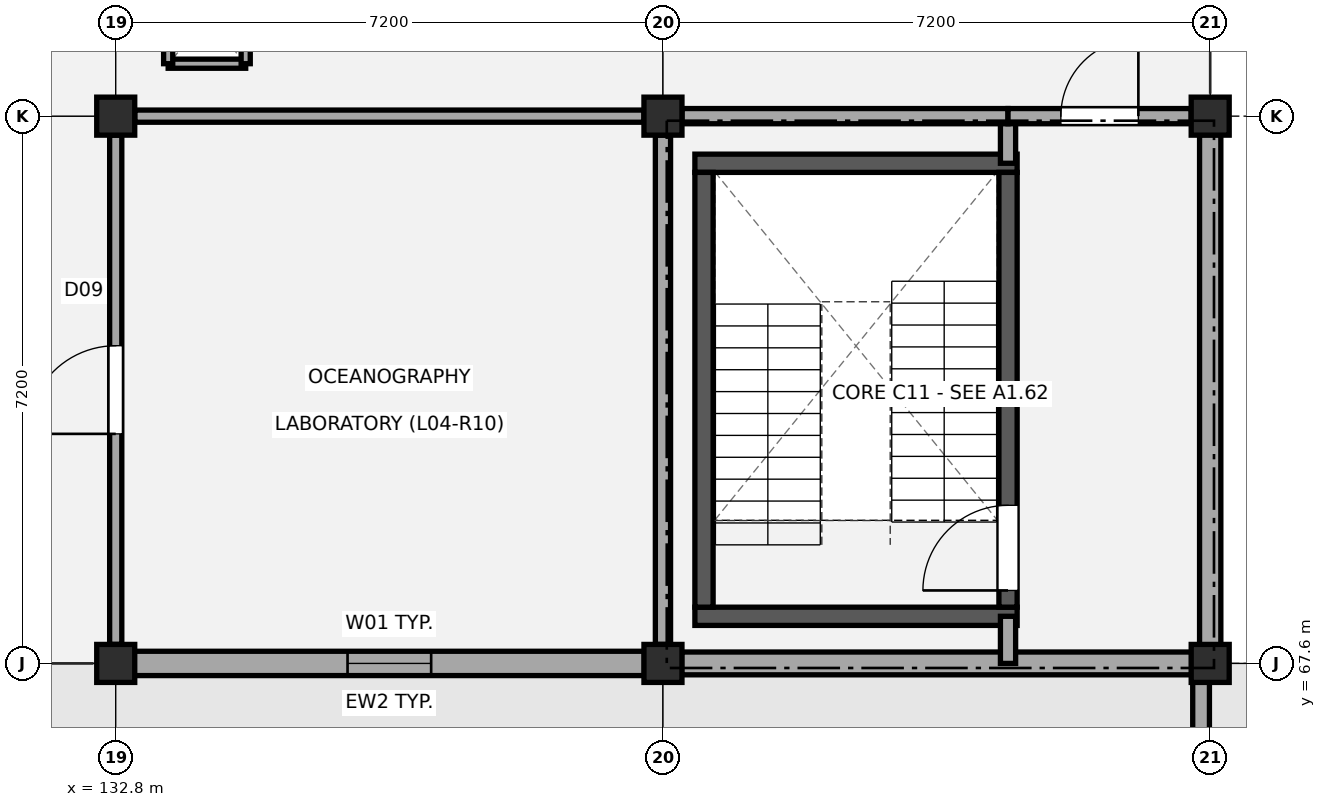
"""IFC4 building model, lengths in metres.
Left out: names, types, materials, properties, quantities, classifications, styles, units other than length and angle.
Written with IfcOpenShell. Run it as: python <this file> out.ifc"""

import sys

from ifc_helpers import new_model, si_unit, direction, frame, frame_2d, origin, origin_2d, place, context, subcontext, project, spatial, rectangle, extrude, element, fill, save


model = new_model("IFC4")
c1 = context("Model", 3, precision=1e-05, world=origin(), true_north=direction((0.0, 1.0)))
c2 = subcontext(c1, "Body", "Model", "MODEL_VIEW")
j1 = project(units=[si_unit("LENGTHUNIT", "METRE"), si_unit("PLANEANGLEUNIT", "RADIAN")], contexts=[c1])
p1 = place(None, origin())
s1 = spatial("IfcSite", under=j1, at=p1, CompositionType="ELEMENT")
p2 = place(p1, origin())
s2 = spatial("IfcBuilding", under=s1, at=p2, CompositionType="ELEMENT")
p3 = place(p2, frame((0.0, 0.0, 17.64)))
s3 = spatial("IfcBuildingStorey", under=s2, at=p3, CompositionType="ELEMENT", Elevation=17.64)
for number, where, z_axis, x_axis in (
    (1, (132.8, 67.6, 0.0), (0.0, 0.0, 1.0), (1.0, 0.0, 0.0)),
    (2, (132.8, 74.8, 0.0), (0.0, 0.0, 1.0), (1.0, 0.0, 0.0)),
    (3, (140.0, 67.6, 0.0), (0.0, 0.0, 1.0), (1.0, 0.0, 0.0)),
    (4, (140.0, 74.8, 0.0), (0.0, 0.0, 1.0), (1.0, 0.0, 0.0)),
    (5, (147.2, 67.6, 0.0), (0.0, 0.0, 1.0), (1.0, 0.0, 0.0)),
    (6, (147.2, 74.8, 0.0), (0.0, 0.0, 1.0), (1.0, 0.0, 0.0)),
):
    element("IfcColumn", number, at=place(p3, frame(where, z_axis=z_axis, x_axis=x_axis)), inside=s3, PredefinedType="COLUMN", context=c2, shape_type="SweptSolid", body=[
        extrude(rectangle(XDim=0.5, YDim=0.5, at=origin_2d()), origin(), (0.0, 0.0, 1.0), 3.96),
    ])
p4 = place(p3, frame((139.755, 67.6, 0.0), z_axis=(0.0, 0.0, 1.0), x_axis=(-1.0, 0.0, 0.0)))
e7 = element("IfcWall", 7, at=p4, inside=s3, PredefinedType="STANDARD", context=c2, shape_type="SweptSolid", body=[
    extrude(rectangle(XDim=6.71, YDim=0.32, at=frame_2d((3.355, 0.0))), origin(), (0.0, 0.0, 1.0), 3.12),
])
p5 = place(p4, frame((2.805, 0.0, 0.95)))
e8 = element("IfcOpeningElement", 8, at=p5, cuts=e7, PredefinedType="OPENING", context=c2, shape_type="SweptSolid", body=[
    extrude(rectangle(XDim=1.1, YDim=1.4, at=frame_2d((0.55, 0.7))), frame((0.0, 0.17, 0.0), z_axis=(0.0, -1.0, 0.0), x_axis=(1.0, 0.0, 0.0)), (0.0, 0.0, 1.0), 0.34),
])
p6 = place(p3, frame((146.955, 67.6, 0.0), z_axis=(0.0, 0.0, 1.0), x_axis=(-1.0, 0.0, 0.0)))
e9 = element("IfcWall", 9, at=p6, inside=s3, PredefinedType="STANDARD", context=c2, shape_type="SweptSolid", body=[
    extrude(rectangle(XDim=6.71, YDim=0.3, at=frame_2d((3.355, 0.0))), origin(), (0.0, 0.0, 1.0), 3.14),
])
p7 = place(p3, frame((147.2, 74.555, 0.0), z_axis=(0.0, 0.0, 1.0), x_axis=(0.0, -1.0, 0.0)))
e10 = element("IfcWall", 10, at=p7, inside=s3, PredefinedType="STANDARD", context=c2, shape_type="SweptSolid", body=[
    extrude(rectangle(XDim=6.71, YDim=0.28, at=frame_2d((3.355, 0.0))), origin(), (0.0, 0.0, 1.0), 3.14),
])
p8 = place(p3, frame((147.08, 60.4, 0.0), z_axis=(0.0, 0.0, 1.0), x_axis=(0.0, 1.0, 0.0)))
e11 = element("IfcWall", 11, at=p8, inside=s3, PredefinedType="PARAPET", context=c2, shape_type="SweptSolid", body=[
    extrude(rectangle(XDim=7.2, YDim=0.22, at=frame_2d((3.6, 0.0))), origin(), (0.0, 0.0, 1.0), 0.72),
])
for number, where, z_axis, x_axis in (
    (12, (140.42, 68.22, 0.0), (0.0, 0.0, 1.0), (1.0, 0.0, 0.0)),
    (13, (140.42, 74.18, 0.0), (0.0, 0.0, 1.0), (1.0, 0.0, 0.0)),
):
    element("IfcWall", number, at=place(p3, frame(where, z_axis=z_axis, x_axis=x_axis)), inside=s3, PredefinedType="SHEAR", context=c2, shape_type="SweptSolid", body=[
        extrude(rectangle(XDim=4.24, YDim=0.24, at=frame_2d((2.12, 0.0))), origin(), (0.0, 0.0, 1.0), 3.7),
    ])
p9 = place(p3, frame((140.54, 68.34, 0.0), z_axis=(0.0, 0.0, 1.0), x_axis=(0.0, 1.0, 0.0)))
e14 = element("IfcWall", 14, at=p9, inside=s3, PredefinedType="SHEAR", context=c2, shape_type="SweptSolid", body=[
    extrude(rectangle(XDim=5.72, YDim=0.24, at=frame_2d((2.86, 0.0))), origin(), (0.0, 0.0, 1.0), 3.7),
])
p10 = place(p3, frame((144.54, 68.34, 0.0), z_axis=(0.0, 0.0, 1.0), x_axis=(0.0, 1.0, 0.0)))
e15 = element("IfcWall", 15, at=p10, inside=s3, PredefinedType="SHEAR", context=c2, shape_type="SweptSolid", body=[
    extrude(rectangle(XDim=5.72, YDim=0.24, at=frame_2d((2.86, 0.0))), origin(), (0.0, 0.0, 1.0), 3.7),
])
p11 = place(p10, frame((0.22, 0.0, 0.0)))
e16 = element("IfcOpeningElement", 16, at=p11, cuts=e15, PredefinedType="OPENING", context=c2, shape_type="SweptSolid", body=[
    extrude(rectangle(XDim=1.12, YDim=2.15, at=frame_2d((0.56, 1.075))), frame((0.0, 0.13, 0.0), z_axis=(0.0, -1.0, 0.0), x_axis=(1.0, 0.0, 0.0)), (0.0, 0.0, 1.0), 0.26),
])
p12 = place(p3, frame((144.54, 67.6, 0.0), z_axis=(0.0, 0.0, 1.0), x_axis=(0.0, 1.0, 0.0)))
e17 = element("IfcWall", 17, at=p12, inside=s3, PredefinedType="PARTITIONING", context=c2, shape_type="SweptSolid", body=[
    extrude(rectangle(XDim=0.62, YDim=0.2, at=frame_2d((0.31, 0.0))), origin(), (0.0, 0.0, 1.0), 3.14),
])
p13 = place(p3, frame((144.54, 74.18, 0.0), z_axis=(0.0, 0.0, 1.0), x_axis=(0.0, 1.0, 0.0)))
e18 = element("IfcWall", 18, at=p13, inside=s3, PredefinedType="PARTITIONING", context=c2, shape_type="SweptSolid", body=[
    extrude(rectangle(XDim=0.62, YDim=0.2, at=frame_2d((0.31, 0.0))), origin(), (0.0, 0.0, 1.0), 3.09),
])
p14 = place(p3, frame((140.0, 67.85, 0.0), z_axis=(0.0, 0.0, 1.0), x_axis=(0.0, 1.0, 0.0)))
e19 = element("IfcWall", 19, at=p14, inside=s3, PredefinedType="PARTITIONING", context=c2, shape_type="SweptSolid", body=[
    extrude(rectangle(XDim=6.7, YDim=0.2, at=frame_2d((3.35, 0.0))), origin(), (0.0, 0.0, 1.0), 3.07),
])
p15 = place(p3, frame((140.25, 74.8, 0.0), z_axis=(0.0, 0.0, 1.0), x_axis=(1.0, 0.0, 0.0)))
e20 = element("IfcWall", 20, at=p15, inside=s3, PredefinedType="PARTITIONING", context=c2, shape_type="SweptSolid", body=[
    extrude(rectangle(XDim=4.29, YDim=0.2, at=frame_2d((2.145, 0.0))), origin(), (0.0, 0.0, 1.0), 3.09),
])
p16 = place(p3, frame((144.54, 74.8, 0.0), z_axis=(0.0, 0.0, 1.0), x_axis=(1.0, 0.0, 0.0)))
e21 = element("IfcWall", 21, at=p16, inside=s3, PredefinedType="PARTITIONING", context=c2, shape_type="SweptSolid", body=[
    extrude(rectangle(XDim=2.41, YDim=0.2, at=frame_2d((1.205, 0.0))), origin(), (0.0, 0.0, 1.0), 3.09),
])
p17 = place(p16, frame((0.695, 0.0, 0.0)))
e22 = element("IfcOpeningElement", 22, at=p17, cuts=e21, PredefinedType="OPENING", context=c2, shape_type="SweptSolid", body=[
    extrude(rectangle(XDim=1.02, YDim=2.15, at=frame_2d((0.51, 1.075))), frame((0.0, 0.11, 0.0), z_axis=(0.0, -1.0, 0.0), x_axis=(1.0, 0.0, 0.0)), (0.0, 0.0, 1.0), 0.22),
])
p18 = place(p3, frame((133.49, 75.49, 0.0), z_axis=(0.0, 0.0, 1.0), x_axis=(1.0, 0.0, 0.0)))
e23 = element("IfcWall", 23, at=p18, inside=s3, PredefinedType="PARTITIONING", context=c2, shape_type="SweptSolid", body=[
    extrude(rectangle(XDim=1.02, YDim=0.12, at=frame_2d((0.51, 0.0))), origin(), (0.0, 0.0, 1.0), 3.66),
])
for number, where, z_axis, x_axis in (
    (24, (133.49, 75.49, 0.0), (0.0, 0.0, 1.0), (0.0, 1.0, 0.0)),
    (25, (134.51, 75.49, 0.0), (0.0, 0.0, 1.0), (0.0, 1.0, 0.0)),
):
    element("IfcWall", number, at=place(p3, frame(where, z_axis=z_axis, x_axis=x_axis)), inside=s3, PredefinedType="PARTITIONING", context=c2, shape_type="SweptSolid", body=[
        extrude(rectangle(XDim=1.32, YDim=0.12, at=frame_2d((0.66, 0.0))), origin(), (0.0, 0.0, 1.0), 3.66),
    ])
p19 = place(p3, frame((132.8, 67.85, 0.0), z_axis=(0.0, 0.0, 1.0), x_axis=(0.0, 1.0, 0.0)))
e26 = element("IfcWall", 26, at=p19, inside=s3, PredefinedType="PARTITIONING", context=c2, shape_type="SweptSolid", body=[
    extrude(rectangle(XDim=6.7, YDim=0.16, at=frame_2d((3.35, 0.0))), origin(), (0.0, 0.0, 1.0), 3.07),
])
p20 = place(p19, frame((2.77, 0.0, 0.0)))
e27 = element("IfcOpeningElement", 27, at=p20, cuts=e26, PredefinedType="OPENING", context=c2, shape_type="SweptSolid", body=[
    extrude(rectangle(XDim=1.16, YDim=2.18, at=frame_2d((0.58, 1.09))), frame((0.0, 0.09, 0.0), z_axis=(0.0, -1.0, 0.0), x_axis=(1.0, 0.0, 0.0)), (0.0, 0.0, 1.0), 0.18),
])
p21 = place(p3, frame((133.05, 74.8, 0.0), z_axis=(0.0, 0.0, 1.0), x_axis=(1.0, 0.0, 0.0)))
e28 = element("IfcWall", 28, at=p21, inside=s3, PredefinedType="PARTITIONING", context=c2, shape_type="SweptSolid", body=[
    extrude(rectangle(XDim=6.7, YDim=0.16, at=frame_2d((3.35, 0.0))), origin(), (0.0, 0.0, 1.0), 3.02),
])
p22 = place(p5, origin())
e29 = element("IfcWindow", 29, at=p22, inside=s3, PartitioningType="SINGLE_PANEL", PredefinedType="WINDOW", context=c2, shape_type="SweptSolid", body=[
    extrude(rectangle(XDim=1.1, YDim=1.4, at=frame_2d((0.55, 0.7))), frame((0.0, 0.03, 0.0), z_axis=(0.0, -1.0, 0.0), x_axis=(1.0, 0.0, 0.0)), (0.0, 0.0, 1.0), 0.06),
])
fill(e8, e29)
p23 = place(p11, origin())
e30 = element("IfcDoor", 30, at=p23, inside=s3, OperationType="SINGLE_SWING_LEFT", PredefinedType="DOOR", context=c2, shape_type="SweptSolid", body=[
    extrude(rectangle(XDim=1.12, YDim=2.15, at=frame_2d((0.56, 1.075))), frame((0.0, 0.025, 0.0), z_axis=(0.0, -1.0, 0.0), x_axis=(1.0, 0.0, 0.0)), (0.0, 0.0, 1.0), 0.05),
])
fill(e16, e30)
p24 = place(p17, origin())
e31 = element("IfcDoor", 31, at=p24, inside=s3, OperationType="SINGLE_SWING_RIGHT", PredefinedType="DOOR", context=c2, shape_type="SweptSolid", body=[
    extrude(rectangle(XDim=1.02, YDim=2.15, at=frame_2d((0.51, 1.075))), frame((0.0, 0.025, 0.0), z_axis=(0.0, -1.0, 0.0), x_axis=(1.0, 0.0, 0.0)), (0.0, 0.0, 1.0), 0.05),
])
fill(e22, e31)
p25 = place(p20, origin())
e32 = element("IfcDoor", 32, at=p25, inside=s3, OperationType="SINGLE_SWING_LEFT", PredefinedType="DOOR", context=c2, shape_type="SweptSolid", body=[
    extrude(rectangle(XDim=1.16, YDim=2.18, at=frame_2d((0.58, 1.09))), frame((0.0, 0.025, 0.0), z_axis=(0.0, -1.0, 0.0), x_axis=(1.0, 0.0, 0.0)), (0.0, 0.0, 1.0), 0.05),
])
fill(e27, e32)
save(model, sys.argv[1])
